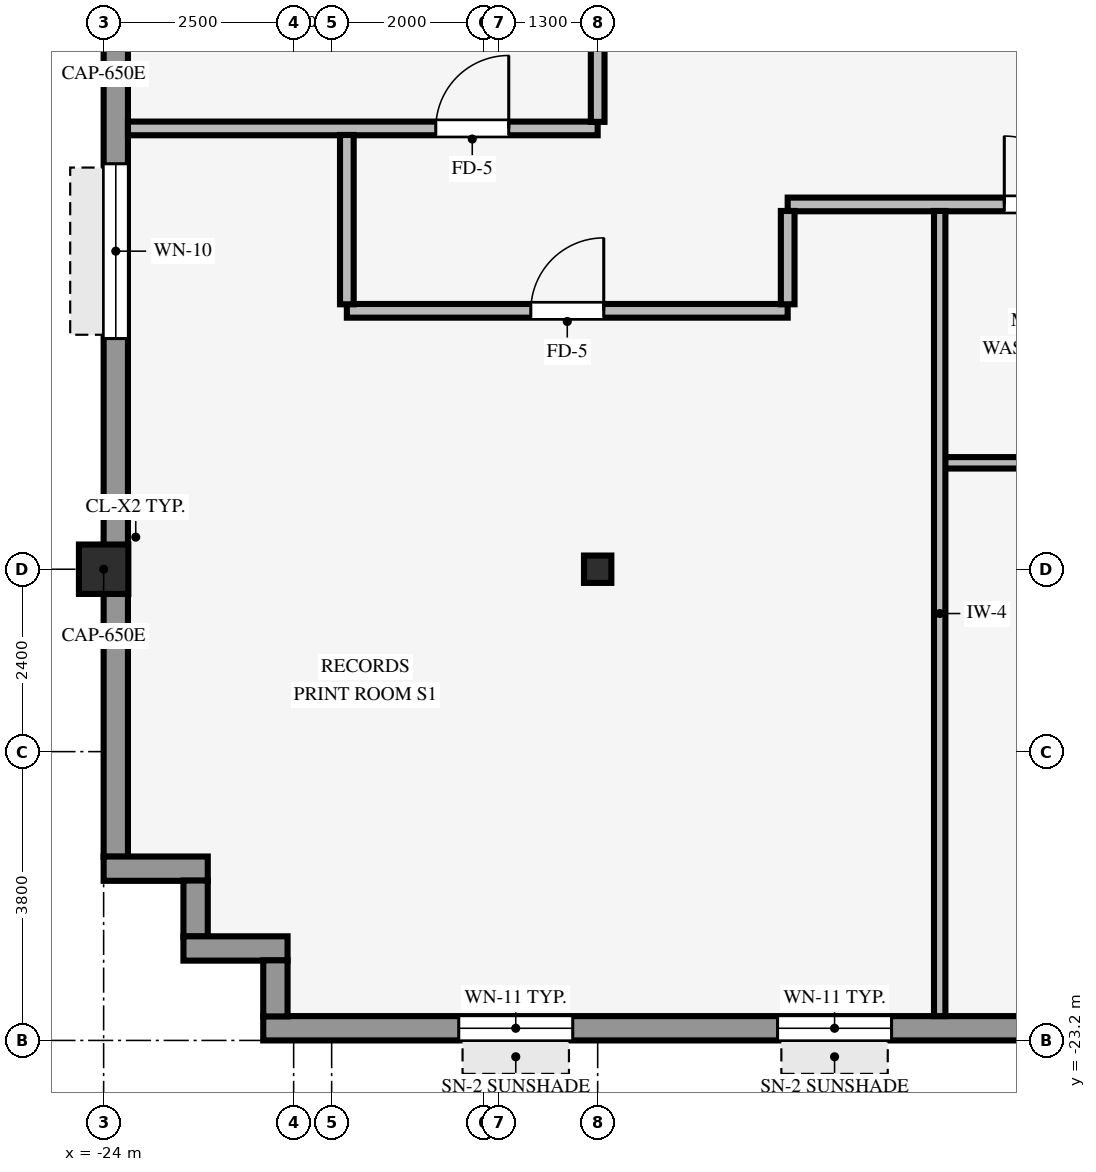
"""IFC4 building model, lengths in metres.
Left out: names, types, materials, properties, quantities, classifications, styles, units other than length and angle.
Written with IfcOpenShell. Run it as: python <this file> out.ifc"""

import sys

from ifc_helpers import new_model, si_unit, direction, frame, frame_2d, origin, origin_2d, place, context, subcontext, project, spatial, rectangle, hollow_rectangle, i_section, extrude, source, transform, mapped, element, fill, save


model = new_model("IFC4")
c1 = context("Model", 3, precision=1e-05, world=origin(), true_north=direction((0.0, 1.0)))
c2 = subcontext(c1, "Body", "Model", "MODEL_VIEW")
j1 = project(units=[si_unit("LENGTHUNIT", "METRE"), si_unit("PLANEANGLEUNIT", "RADIAN")], contexts=[c1])
p1 = place(None, origin())
s1 = spatial("IfcSite", under=j1, at=p1, CompositionType="ELEMENT")
p2 = place(p1, origin())
s2 = spatial("IfcBuilding", under=s1, at=p2, CompositionType="ELEMENT")
p3 = place(p2, frame((0.0, 0.0, 112.9)))
s3 = spatial("IfcBuildingStorey", under=s2, at=p3, CompositionType="ELEMENT", Elevation=112.9)
p4 = place(p3, frame((-24.0, -17.0, 0.0), z_axis=(0.0, 0.0, 1.0), x_axis=(1.0, 0.0, 0.0)))
e1 = element("IfcColumn", 1, at=p4, inside=s3, PredefinedType="COLUMN", context=c2, shape_type="SweptSolid", body=[
    extrude(hollow_rectangle(XDim=0.65, YDim=0.65, WallThickness=0.04, InnerFilletRadius=0.04, OuterFilletRadius=0.08, at=origin_2d()), origin(), (0.0, 0.0, 1.0), 3.25),
])
p5 = place(p3, frame((-17.5, -17.0, 0.0), z_axis=(0.0, 0.0, 1.0), x_axis=(1.0, 0.0, 0.0)))
e2 = element("IfcColumn", 2, at=p5, inside=s3, PredefinedType="COLUMN", context=c2, shape_type="SweptSolid", body=[
    extrude(i_section(OverallWidth=0.36, OverallDepth=0.36, WebThickness=0.021, FlangeThickness=0.021, FilletRadius=0.018, at=origin_2d()), origin(), (0.0, 0.0, 1.0), 3.25),
])
p6 = place(p3, frame((-21.9, -23.04, 0.0), z_axis=(0.0, 0.0, 1.0), x_axis=(1.0, 0.0, 0.0)))
e3 = element("IfcWall", 3, at=p6, inside=s3, PredefinedType="STANDARD", context=c2, shape_type="SweptSolid", body=[
    extrude(rectangle(XDim=43.8, YDim=0.32, at=frame_2d((21.9, 0.0))), origin(), (0.0, 0.0, 1.0), 2.585),
])
p7 = place(p6, frame((17.55, 0.0, 0.0), z_axis=(0.0, 0.0, 1.0), x_axis=(-1.0, 0.0, 0.0)))
e4 = element("IfcOpeningElement", 4, at=p7, cuts=e3, PredefinedType="OPENING", context=c2, shape_type="SweptSolid", body=[
    extrude(rectangle(XDim=1.05, YDim=2.1, at=frame_2d((0.525, 1.05))), frame((0.0, 0.17, 0.0), z_axis=(0.0, -1.0, 0.0), x_axis=(1.0, 0.0, 0.0)), (0.0, 0.0, 1.0), 0.34),
])
p8 = place(p6, frame((2.572, 0.0, 0.8)))
e5 = element("IfcOpeningElement", 5, at=p8, cuts=e3, PredefinedType="OPENING", context=c2, shape_type="SweptSolid", body=[
    extrude(rectangle(XDim=1.5, YDim=1.6, at=frame_2d((0.75, 0.8))), frame((0.0, 0.17, 0.0), z_axis=(0.0, -1.0, 0.0), x_axis=(1.0, 0.0, 0.0)), (0.0, 0.0, 1.0), 0.34),
])
p9 = place(p6, frame((6.767, 0.0, 0.8)))
e6 = element("IfcOpeningElement", 6, at=p9, cuts=e3, PredefinedType="OPENING", context=c2, shape_type="SweptSolid", body=[
    extrude(rectangle(XDim=1.5, YDim=1.6, at=frame_2d((0.75, 0.8))), frame((0.0, 0.17, 0.0), z_axis=(0.0, -1.0, 0.0), x_axis=(1.0, 0.0, 0.0)), (0.0, 0.0, 1.0), 0.34),
])
p10 = place(p6, frame((10.511, 0.0, 0.8)))
e7 = element("IfcOpeningElement", 7, at=p10, cuts=e3, PredefinedType="OPENING", context=c2, shape_type="SweptSolid", body=[
    extrude(rectangle(XDim=1.5, YDim=1.6, at=frame_2d((0.75, 0.8))), frame((0.0, 0.17, 0.0), z_axis=(0.0, -1.0, 0.0), x_axis=(1.0, 0.0, 0.0)), (0.0, 0.0, 1.0), 0.34),
])
p11 = place(p6, frame((25.794, 0.0, 0.8)))
e8 = element("IfcOpeningElement", 8, at=p11, cuts=e3, PredefinedType="OPENING", context=c2, shape_type="SweptSolid", body=[
    extrude(rectangle(XDim=1.5, YDim=1.6, at=frame_2d((0.75, 0.8))), frame((0.0, 0.17, 0.0), z_axis=(0.0, -1.0, 0.0), x_axis=(1.0, 0.0, 0.0)), (0.0, 0.0, 1.0), 0.34),
])
p12 = place(p6, frame((31.789, 0.0, 0.8)))
e9 = element("IfcOpeningElement", 9, at=p12, cuts=e3, PredefinedType="OPENING", context=c2, shape_type="SweptSolid", body=[
    extrude(rectangle(XDim=1.5, YDim=1.6, at=frame_2d((0.75, 0.8))), frame((0.0, 0.17, 0.0), z_axis=(0.0, -1.0, 0.0), x_axis=(1.0, 0.0, 0.0)), (0.0, 0.0, 1.0), 0.34),
])
p13 = place(p6, frame((35.083, 0.0, 0.8)))
e10 = element("IfcOpeningElement", 10, at=p13, cuts=e3, PredefinedType="OPENING", context=c2, shape_type="SweptSolid", body=[
    extrude(rectangle(XDim=1.5, YDim=1.6, at=frame_2d((0.75, 0.8))), frame((0.0, 0.17, 0.0), z_axis=(0.0, -1.0, 0.0), x_axis=(1.0, 0.0, 0.0)), (0.0, 0.0, 1.0), 0.34),
])
p14 = place(p6, frame((39.728, 0.0, 0.8)))
e11 = element("IfcOpeningElement", 11, at=p14, cuts=e3, PredefinedType="OPENING", context=c2, shape_type="SweptSolid", body=[
    extrude(rectangle(XDim=1.5, YDim=1.6, at=frame_2d((0.75, 0.8))), frame((0.0, 0.17, 0.0), z_axis=(0.0, -1.0, 0.0), x_axis=(1.0, 0.0, 0.0)), (0.0, 0.0, 1.0), 0.34),
])
p15 = place(p3, frame((-23.84, -20.784, 0.0), z_axis=(0.0, 0.0, 1.0), x_axis=(0.0, 1.0, 0.0)))
e12 = element("IfcWall", 12, at=p15, inside=s3, PredefinedType="STANDARD", context=c2, shape_type="SweptSolid", body=[
    extrude(rectangle(XDim=41.568, YDim=0.32, at=frame_2d((20.784, 0.0))), origin(), (0.0, 0.0, 1.0), 3.24),
])
p16 = place(p15, frame((6.819, 0.0, 0.8)))
e13 = element("IfcOpeningElement", 13, at=p16, cuts=e12, PredefinedType="OPENING", context=c2, shape_type="SweptSolid", body=[
    extrude(rectangle(XDim=2.3, YDim=1.62, at=frame_2d((1.15, 0.81))), frame((0.0, 0.17, 0.0), z_axis=(0.0, -1.0, 0.0), x_axis=(1.0, 0.0, 0.0)), (0.0, 0.0, 1.0), 0.34),
])
p17 = place(p15, frame((17.161, 0.0, 0.8)))
e14 = element("IfcOpeningElement", 14, at=p17, cuts=e12, PredefinedType="OPENING", context=c2, shape_type="SweptSolid", body=[
    extrude(rectangle(XDim=2.3, YDim=1.62, at=frame_2d((1.15, 0.81))), frame((0.0, 0.17, 0.0), z_axis=(0.0, -1.0, 0.0), x_axis=(1.0, 0.0, 0.0)), (0.0, 0.0, 1.0), 0.34),
])
p18 = place(p15, frame((32.449, 0.0, 0.8)))
e15 = element("IfcOpeningElement", 15, at=p18, cuts=e12, PredefinedType="OPENING", context=c2, shape_type="SweptSolid", body=[
    extrude(rectangle(XDim=2.3, YDim=1.62, at=frame_2d((1.15, 0.81))), frame((0.0, 0.17, 0.0), z_axis=(0.0, -1.0, 0.0), x_axis=(1.0, 0.0, 0.0)), (0.0, 0.0, 1.0), 0.34),
])
p19 = place(p3, frame((-24.0, -20.94, 0.0), z_axis=(0.0, 0.0, 1.0), x_axis=(1.0, 0.0, 0.0)))
e16 = element("IfcWall", 16, at=p19, inside=s3, PredefinedType="STANDARD", context=c2, shape_type="SweptSolid", body=[
    extrude(rectangle(XDim=1.37, YDim=0.32, at=frame_2d((0.685, 0.0))), origin(), (0.0, 0.0, 1.0), 3.24),
])
p20 = place(p3, frame((-22.79, -21.834, 0.0), z_axis=(0.0, 0.0, 1.0), x_axis=(0.0, 1.0, 0.0)))
e17 = element("IfcWall", 17, at=p20, inside=s3, PredefinedType="STANDARD", context=c2, shape_type="SweptSolid", body=[
    extrude(rectangle(XDim=0.738, YDim=0.32, at=frame_2d((0.369, 0.0))), origin(), (0.0, 0.0, 1.0), 3.24),
])
p21 = place(p3, frame((-22.95, -21.99, 0.0), z_axis=(0.0, 0.0, 1.0), x_axis=(1.0, 0.0, 0.0)))
e18 = element("IfcWall", 18, at=p21, inside=s3, PredefinedType="STANDARD", context=c2, shape_type="SweptSolid", body=[
    extrude(rectangle(XDim=1.37, YDim=0.32, at=frame_2d((0.685, 0.0))), origin(), (0.0, 0.0, 1.0), 3.24),
])
p22 = place(p3, frame((-21.74, -22.884, 0.0), z_axis=(0.0, 0.0, 1.0), x_axis=(0.0, 1.0, 0.0)))
e19 = element("IfcWall", 19, at=p22, inside=s3, PredefinedType="STANDARD", context=c2, shape_type="SweptSolid", body=[
    extrude(rectangle(XDim=0.738, YDim=0.32, at=frame_2d((0.369, 0.0))), origin(), (0.0, 0.0, 1.0), 3.24),
])
p23 = place(p3, frame((-12.934, -15.6, 0.0), z_axis=(0.0, 0.0, 1.0), x_axis=(1.0, 0.0, 0.0)))
e20 = element("IfcWall", 20, at=p23, inside=s3, PredefinedType="PARTITIONING", context=c2, shape_type="SweptSolid", body=[
    extrude(rectangle(XDim=7.534, YDim=0.15, at=frame_2d((3.767, 0.0))), origin(), (0.0, 0.0, 1.0), 3.24),
])
p24 = place(p3, frame((-20.8, -13.6, 0.0), z_axis=(0.0, 0.0, 1.0), x_axis=(1.0, 0.0, 0.0)))
e21 = element("IfcWall", 21, at=p24, inside=s3, PredefinedType="PARTITIONING", context=c2, shape_type="SweptSolid", body=[
    extrude(rectangle(XDim=5.8, YDim=0.18, at=frame_2d((2.9, 0.0))), origin(), (0.0, 0.0, 1.0), 2.878),
])
p25 = place(p24, frame((2.42, 0.0, 0.0)))
e22 = element("IfcOpeningElement", 22, at=p25, cuts=e21, PredefinedType="OPENING", context=c2, shape_type="SweptSolid", body=[
    extrude(rectangle(XDim=0.96, YDim=2.1, at=frame_2d((0.48, 1.05))), frame((0.0, 0.1, 0.0), z_axis=(0.0, -1.0, 0.0), x_axis=(1.0, 0.0, 0.0)), (0.0, 0.0, 1.0), 0.2),
])
p26 = place(p3, frame((-15.0, -12.2, 0.0), z_axis=(0.0, 0.0, 1.0), x_axis=(1.0, 0.0, 0.0)))
e23 = element("IfcWall", 23, at=p26, inside=s3, PredefinedType="PARTITIONING", context=c2, shape_type="SweptSolid", body=[
    extrude(rectangle(XDim=30.0, YDim=0.18, at=frame_2d((15.0, 0.0))), origin(), (0.0, 0.0, 1.0), 3.24),
])
p27 = place(p26, frame((17.935, 0.0, 0.0)))
e24 = element("IfcOpeningElement", 24, at=p27, cuts=e23, PredefinedType="OPENING", context=c2, shape_type="SweptSolid", body=[
    extrude(rectangle(XDim=0.96, YDim=2.1, at=frame_2d((0.48, 1.05))), frame((0.0, 0.1, 0.0), z_axis=(0.0, -1.0, 0.0), x_axis=(1.0, 0.0, 0.0)), (0.0, 0.0, 1.0), 0.2),
])
p28 = place(p26, frame((25.835, 0.0, 0.0)))
e25 = element("IfcOpeningElement", 25, at=p28, cuts=e23, PredefinedType="OPENING", context=c2, shape_type="SweptSolid", body=[
    extrude(rectangle(XDim=0.96, YDim=2.1, at=frame_2d((0.48, 1.05))), frame((0.0, 0.1, 0.0), z_axis=(0.0, -1.0, 0.0), x_axis=(1.0, 0.0, 0.0)), (0.0, 0.0, 1.0), 0.2),
])
p29 = place(p26, frame((5.45, 0.0, 0.0)))
e26 = element("IfcOpeningElement", 26, at=p29, cuts=e23, PredefinedType="OPENING", context=c2, shape_type="SweptSolid", body=[
    extrude(rectangle(XDim=0.9, YDim=2.1, at=frame_2d((0.45, 1.05))), frame((0.0, 0.1, 0.0), z_axis=(0.0, -1.0, 0.0), x_axis=(1.0, 0.0, 0.0)), (0.0, 0.0, 1.0), 0.2),
])
p30 = place(p26, frame((2.85, 0.0, 0.0)))
e27 = element("IfcOpeningElement", 27, at=p30, cuts=e23, PredefinedType="OPENING", context=c2, shape_type="SweptSolid", body=[
    extrude(rectangle(XDim=0.9, YDim=2.1, at=frame_2d((0.45, 1.05))), frame((0.0, 0.1, 0.0), z_axis=(0.0, -1.0, 0.0), x_axis=(1.0, 0.0, 0.0)), (0.0, 0.0, 1.0), 0.2),
])
p31 = place(p26, frame((12.52, 0.0, 0.0)))
e28 = element("IfcOpeningElement", 28, at=p31, cuts=e23, PredefinedType="OPENING", context=c2, shape_type="SweptSolid", body=[
    extrude(rectangle(XDim=0.96, YDim=2.1, at=frame_2d((0.48, 1.05))), frame((0.0, 0.1, 0.0), z_axis=(0.0, -1.0, 0.0), x_axis=(1.0, 0.0, 0.0)), (0.0, 0.0, 1.0), 0.2),
])
p32 = place(p26, frame((7.95, 0.0, 0.0)))
e29 = element("IfcOpeningElement", 29, at=p32, cuts=e23, PredefinedType="OPENING", context=c2, shape_type="SweptSolid", body=[
    extrude(rectangle(XDim=0.9, YDim=2.1, at=frame_2d((0.45, 1.05))), frame((0.0, 0.1, 0.0), z_axis=(0.0, -1.0, 0.0), x_axis=(1.0, 0.0, 0.0)), (0.0, 0.0, 1.0), 0.2),
])
p33 = place(p3, frame((-23.68, -11.2, 0.0), z_axis=(0.0, 0.0, 1.0), x_axis=(1.0, 0.0, 0.0)))
e30 = element("IfcWall", 30, at=p33, inside=s3, PredefinedType="PARTITIONING", context=c2, shape_type="SweptSolid", body=[
    extrude(rectangle(XDim=6.18, YDim=0.18, at=frame_2d((3.09, 0.0))), origin(), (0.0, 0.0, 1.0), 3.24),
])
p34 = place(p33, frame((4.05, 0.0, 0.0)))
e31 = element("IfcOpeningElement", 31, at=p34, cuts=e30, PredefinedType="OPENING", context=c2, shape_type="SweptSolid", body=[
    extrude(rectangle(XDim=0.96, YDim=2.1, at=frame_2d((0.48, 1.05))), frame((0.0, 0.1, 0.0), z_axis=(0.0, -1.0, 0.0), x_axis=(1.0, 0.0, 0.0)), (0.0, 0.0, 1.0), 0.2),
])
p35 = place(p3, frame((-20.8, -13.514, 0.0), z_axis=(0.0, 0.0, 1.0), x_axis=(0.0, 1.0, 0.0)))
e32 = element("IfcWall", 32, at=p35, inside=s3, PredefinedType="PARTITIONING", context=c2, shape_type="SweptSolid", body=[
    extrude(rectangle(XDim=2.228, YDim=0.18, at=frame_2d((1.114, 0.0))), origin(), (0.0, 0.0, 1.0), 3.24),
])
p36 = place(p3, frame((-17.5, -11.114, 0.0), z_axis=(0.0, 0.0, 1.0), x_axis=(0.0, 1.0, 0.0)))
e33 = element("IfcWall", 33, at=p36, inside=s3, PredefinedType="PARTITIONING", context=c2, shape_type="SweptSolid", body=[
    extrude(rectangle(XDim=0.968, YDim=0.18, at=frame_2d((0.484, 0.0))), origin(), (0.0, 0.0, 1.0), 2.618),
])
p37 = place(p3, frame((-15.0, -13.514, 0.0), z_axis=(0.0, 0.0, 1.0), x_axis=(0.0, 1.0, 0.0)))
e34 = element("IfcWall", 34, at=p37, inside=s3, PredefinedType="PARTITIONING", context=c2, shape_type="SweptSolid", body=[
    extrude(rectangle(XDim=1.228, YDim=0.18, at=frame_2d((0.614, 0.0))), origin(), (0.0, 0.0, 1.0), 3.24),
])
p38 = place(p3, frame((-13.0, -22.88, 0.0), z_axis=(0.0, 0.0, 1.0), x_axis=(0.0, 1.0, 0.0)))
e35 = element("IfcWall", 35, at=p38, inside=s3, PredefinedType="PARTITIONING", context=c2, shape_type="SweptSolid", body=[
    extrude(rectangle(XDim=10.594, YDim=0.15, at=frame_2d((5.297, 0.0))), origin(), (0.0, 0.0, 1.0), 3.24),
])
m1 = source(origin(), c2, "Body", "SweptSolid", [
    extrude(rectangle(XDim=1.5, YDim=1.6, at=frame_2d((0.75, 0.8))), frame((0.0, 0.03, 0.0), z_axis=(0.0, -1.0, 0.0), x_axis=(1.0, 0.0, 0.0)), (0.0, 0.0, 1.0), 0.06),
])
p39 = place(p8, origin())
e36 = element("IfcWindow", 36, at=p39, inside=s3, PartitioningType="SINGLE_PANEL", PredefinedType="WINDOW", context=c2, shape_type="MappedRepresentation", body=[
    mapped(m1, transform((0.0, 0.0, 0.0), scale=1.0)),
])
fill(e5, e36)
p40 = place(p9, origin())
e37 = element("IfcWindow", 37, at=p40, inside=s3, PartitioningType="SINGLE_PANEL", PredefinedType="WINDOW", context=c2, shape_type="MappedRepresentation", body=[
    mapped(m1, transform((0.0, 0.0, 0.0), scale=1.0)),
])
fill(e6, e37)
m2 = source(origin(), c2, "Body", "SweptSolid", [
    extrude(rectangle(XDim=2.3, YDim=1.62, at=frame_2d((1.15, 0.81))), frame((0.0, 0.03, 0.0), z_axis=(0.0, -1.0, 0.0), x_axis=(1.0, 0.0, 0.0)), (0.0, 0.0, 1.0), 0.06),
])
p41 = place(p16, origin())
e38 = element("IfcWindow", 38, at=p41, inside=s3, PartitioningType="SINGLE_PANEL", PredefinedType="WINDOW", context=c2, shape_type="MappedRepresentation", body=[
    mapped(m2, transform((0.0, 0.0, 0.0), scale=1.0)),
])
fill(e13, e38)
m3 = source(origin(), c2, "Body", "SweptSolid", [
    extrude(rectangle(XDim=0.96, YDim=2.1, at=frame_2d((0.48, 1.05))), frame((0.0, 0.025, 0.0), z_axis=(0.0, -1.0, 0.0), x_axis=(1.0, 0.0, 0.0)), (0.0, 0.0, 1.0), 0.05),
])
p42 = place(p25, origin())
e39 = element("IfcDoor", 39, at=p42, inside=s3, OperationType="SINGLE_SWING_RIGHT", PredefinedType="DOOR", context=c2, shape_type="MappedRepresentation", body=[
    mapped(m3, transform((0.0, 0.0, 0.0), scale=1.0)),
])
fill(e22, e39)
p43 = place(p34, origin())
e40 = element("IfcDoor", 40, at=p43, inside=s3, OperationType="SINGLE_SWING_RIGHT", PredefinedType="DOOR", context=c2, shape_type="MappedRepresentation", body=[
    mapped(m3, transform((0.0, 0.0, 0.0), scale=1.0)),
])
fill(e31, e40)
m4 = source(origin(), c2, "Body", "SweptSolid", [
    extrude(rectangle(XDim=0.9, YDim=2.1, at=frame_2d((0.45, 1.05))), frame((0.0, 0.025, 0.0), z_axis=(0.0, -1.0, 0.0), x_axis=(1.0, 0.0, 0.0)), (0.0, 0.0, 1.0), 0.05),
])
p44 = place(p30, origin())
e41 = element("IfcDoor", 41, at=p44, inside=s3, OperationType="SINGLE_SWING_LEFT", PredefinedType="DOOR", context=c2, shape_type="MappedRepresentation", body=[
    mapped(m4, transform((0.0, 0.0, 0.0), scale=1.0)),
])
fill(e27, e41)
save(model, sys.argv[1])
